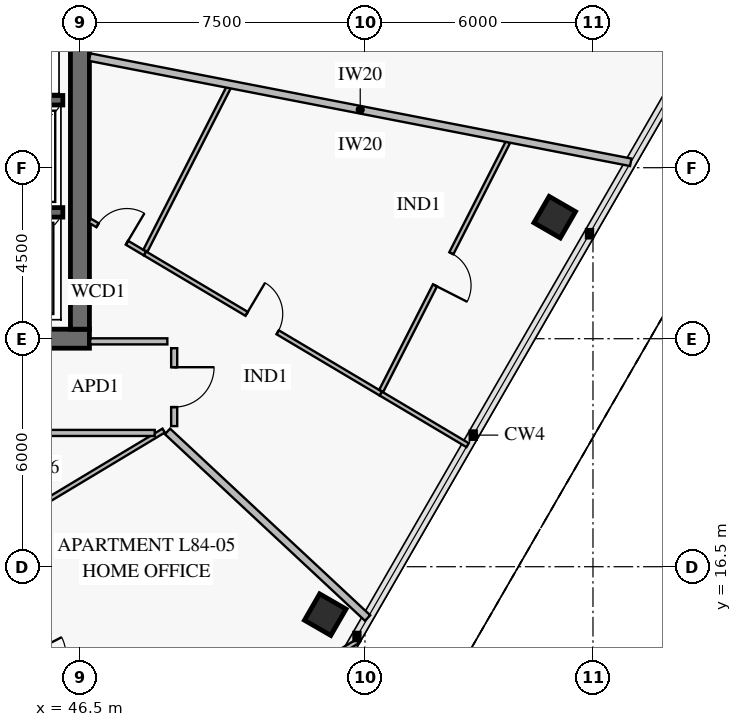
"""IFC4 building model, lengths in metres.
Left out: names, types, materials, properties, quantities, classifications, styles, units other than length and angle.
Written with IfcOpenShell. Run it as: python <this file> out.ifc"""

import sys

from ifc_helpers import new_model, si_unit, direction, frame, frame_2d, origin, origin_2d, place, context, subcontext, project, spatial, rectangle, extrude, element, fill, save


model = new_model("IFC4")
c1 = context("Model", 3, precision=1e-05, world=origin(), true_north=direction((0.0, 1.0)))
c2 = subcontext(c1, "Body", "Model", "MODEL_VIEW")
j1 = project(units=[si_unit("LENGTHUNIT", "METRE"), si_unit("PLANEANGLEUNIT", "RADIAN")], contexts=[c1])
p1 = place(None, origin())
s1 = spatial("IfcSite", under=j1, at=p1, CompositionType="ELEMENT")
p2 = place(p1, origin())
s2 = spatial("IfcBuilding", under=s1, at=p2, CompositionType="ELEMENT")
p3 = place(p2, frame((0.0, 0.0, 331.0)))
s3 = spatial("IfcBuildingStorey", under=s2, at=p3, CompositionType="ELEMENT", Elevation=331.0)
p4 = place(p3, frame((37.35, 22.5, 0.0), z_axis=(0.0, 0.0, 1.0), x_axis=(1.0, 0.0, 0.0)))
e1 = element("IfcWall", 1, at=p4, inside=s3, PredefinedType="SHEAR", context=c2, shape_type="SweptSolid", body=[
    extrude(rectangle(XDim=9.4, YDim=0.5, at=frame_2d((4.7, 0.0))), origin(), (0.0, 0.0, 1.0), 3.8),
])
p5 = place(p4, frame((3.95, 0.0, 0.0)))
e2 = element("IfcOpeningElement", 2, at=p5, cuts=e1, PredefinedType="OPENING", context=c2, shape_type="SweptSolid", body=[
    extrude(rectangle(XDim=1.5, YDim=2.15, at=frame_2d((0.75, 1.075))), frame((0.0, 0.262, 0.0), z_axis=(0.0, -1.0, 0.0), x_axis=(1.0, 0.0, 0.0)), (0.0, 0.0, 1.0), 0.524),
])
p6 = place(p3, frame((46.5, 22.75, 0.0), z_axis=(0.0, 0.0, 1.0), x_axis=(0.0, 1.0, 0.0)))
e3 = element("IfcWall", 3, at=p6, inside=s3, PredefinedType="SHEAR", context=c2, shape_type="SweptSolid", body=[
    extrude(rectangle(XDim=18.5, YDim=0.5, at=frame_2d((9.25, 0.0))), origin(), (0.0, 0.0, 1.0), 3.8),
])
p7 = place(p6, frame((9.0, 0.0, 0.0)))
e4 = element("IfcOpeningElement", 4, at=p7, cuts=e3, PredefinedType="OPENING", context=c2, shape_type="SweptSolid", body=[
    extrude(rectangle(XDim=1.1, YDim=2.15, at=frame_2d((0.55, 1.075))), frame((0.0, 0.262, 0.0), z_axis=(0.0, -1.0, 0.0), x_axis=(1.0, 0.0, 0.0)), (0.0, 0.0, 1.0), 0.524),
])
for number, where, z_axis, x_axis in (
    (5, (52.955, 15.238, 0.0), (0.0, 0.0, 1.0), (0.5, 0.866, 0.0)),
    (6, (58.993, 25.698, 0.0), (0.0, 0.0, 1.0), (0.5, 0.866, 0.0)),
):
    element("IfcColumn", number, at=place(p3, frame(where, z_axis=z_axis, x_axis=x_axis)), inside=s3, PredefinedType="COLUMN", context=c2, shape_type="SweptSolid", body=[
        extrude(rectangle(XDim=0.8, YDim=0.8, at=origin_2d()), origin(), (0.0, 0.0, 1.0), 3.55),
    ])
for number, where, z_axis, x_axis in (
    (7, (43.8, 25.825, 0.0), (0.0, 0.0, 1.0), (1.0, 0.0, 0.0)),
    (8, (43.8, 28.775, 0.0), (0.0, 0.0, 1.0), (1.0, 0.0, 0.0)),
):
    element("IfcWall", number, at=place(p3, frame(where, z_axis=z_axis, x_axis=x_axis)), inside=s3, PredefinedType="SOLIDWALL", context=c2, shape_type="SweptSolid", body=[
        extrude(rectangle(XDim=2.25, YDim=0.25, at=frame_2d((1.125, 0.0))), origin(), (0.0, 0.0, 1.0), 3.8),
    ])
p8 = place(p3, frame((43.708, 17.052, 0.0), z_axis=(0.0, 0.0, 1.0), x_axis=(0.458373868426, -0.888759470692, 0.0)))
e9 = element("IfcWall", 9, at=p8, inside=s3, PredefinedType="PARTITIONING", context=c2, shape_type="SweptSolid", body=[
    extrude(rectangle(XDim=7.397, YDim=0.12, at=frame_2d((3.698, 0.0))), origin(), (0.0, 0.0, 1.0), 2.97),
])
p9 = place(p8, frame((3.198, 0.0, 0.0)))
e10 = element("IfcOpeningElement", 10, at=p9, cuts=e9, PredefinedType="OPENING", context=c2, shape_type="SweptSolid", body=[
    extrude(rectangle(XDim=0.95, YDim=2.1, at=frame_2d((0.475, 1.05))), frame((0.0, 0.072, 0.0), z_axis=(0.0, -1.0, 0.0), x_axis=(1.0, 0.0, 0.0)), (0.0, 0.0, 1.0), 0.144),
])
p10 = place(p3, frame((47.146, 10.535, 0.0), z_axis=(0.0, 0.0, 1.0), x_axis=(0.857151907368, 0.515063692853, 0.0)))
e11 = element("IfcWall", 11, at=p10, inside=s3, PredefinedType="PARTITIONING", context=c2, shape_type="SweptSolid", body=[
    extrude(rectangle(XDim=7.774, YDim=0.12, at=frame_2d((3.887, 0.0))), origin(), (0.0, 0.0, 1.0), 3.55),
])
p11 = place(p10, frame((2.228, 0.0, 0.0)))
e12 = element("IfcOpeningElement", 12, at=p11, cuts=e11, PredefinedType="OPENING", context=c2, shape_type="SweptSolid", body=[
    extrude(rectangle(XDim=0.95, YDim=2.1, at=frame_2d((0.475, 1.05))), frame((0.0, 0.072, 0.0), z_axis=(0.0, -1.0, 0.0), x_axis=(1.0, 0.0, 0.0)), (0.0, 0.0, 1.0), 0.144),
])
p12 = place(p3, frame((46.758, 25.607, 0.0), z_axis=(0.0, 0.0, 1.0), x_axis=(0.859597506205, -0.51097174807, 0.0)))
e13 = element("IfcWall", 13, at=p12, inside=s3, PredefinedType="PARTITIONING", context=c2, shape_type="SweptSolid", body=[
    extrude(rectangle(XDim=1.693, YDim=0.12, at=frame_2d((0.847, 0.0))), origin(), (0.0, 0.0, 1.0), 3.55),
])
p13 = place(p12, frame((0.239, 0.0, 0.0)))
e14 = element("IfcOpeningElement", 14, at=p13, cuts=e13, PredefinedType="OPENING", context=c2, shape_type="SweptSolid", body=[
    extrude(rectangle(XDim=0.9, YDim=2.1, at=frame_2d((0.45, 1.05))), frame((0.0, 0.072, 0.0), z_axis=(0.0, -1.0, 0.0), x_axis=(1.0, 0.0, 0.0)), (0.0, 0.0, 1.0), 0.144),
])
p14 = place(p3, frame((48.214, 24.742, 0.0), z_axis=(0.0, 0.0, 1.0), x_axis=(0.859681622752, -0.510830213968, 0.0)))
e15 = element("IfcWall", 15, at=p14, inside=s3, PredefinedType="PARTITIONING", context=c2, shape_type="SweptSolid", body=[
    extrude(rectangle(XDim=7.218, YDim=0.12, at=frame_2d((3.609, 0.0))), origin(), (0.0, 0.0, 1.0), 3.2),
])
p15 = place(p14, frame((3.109, 0.0, 0.0)))
e16 = element("IfcOpeningElement", 16, at=p15, cuts=e15, PredefinedType="OPENING", context=c2, shape_type="SweptSolid", body=[
    extrude(rectangle(XDim=0.95, YDim=2.1, at=frame_2d((0.475, 1.05))), frame((0.0, 0.072, 0.0), z_axis=(0.0, -1.0, 0.0), x_axis=(1.0, 0.0, 0.0)), (0.0, 0.0, 1.0), 0.144),
])
p16 = place(p3, frame((54.428, 21.128, 0.0), z_axis=(0.0, 0.0, 1.0), x_axis=(0.453980042954, 0.89101185211, 0.0)))
e17 = element("IfcWall", 17, at=p16, inside=s3, PredefinedType="PARTITIONING", context=c2, shape_type="SweptSolid", body=[
    extrude(rectangle(XDim=7.347, YDim=0.12, at=frame_2d((3.673, 0.0))), origin(), (0.0, 0.0, 1.0), 3.0),
])
p17 = place(p16, frame((3.114, 0.0, 0.0)))
e18 = element("IfcOpeningElement", 18, at=p17, cuts=e17, PredefinedType="OPENING", context=c2, shape_type="SweptSolid", body=[
    extrude(rectangle(XDim=0.95, YDim=2.1, at=frame_2d((0.475, 1.05))), frame((0.0, 0.072, 0.0), z_axis=(0.0, -1.0, 0.0), x_axis=(1.0, 0.0, 0.0)), (0.0, 0.0, 1.0), 0.144),
])
p18 = place(p3, frame((48.98, 20.2, 0.0), z_axis=(0.0, 0.0, 1.0), x_axis=(0.0, 1.0, 0.0)))
e19 = element("IfcWall", 19, at=p18, inside=s3, PredefinedType="PARTITIONING", context=c2, shape_type="SweptSolid", body=[
    extrude(rectangle(XDim=2.05, YDim=0.16, at=frame_2d((1.025, 0.0))), origin(), (0.0, 0.0, 1.0), 3.55),
])
p19 = place(p18, frame((0.5, 0.0, 0.0)))
e20 = element("IfcOpeningElement", 20, at=p19, cuts=e19, PredefinedType="OPENING", context=c2, shape_type="SweptSolid", body=[
    extrude(rectangle(XDim=1.05, YDim=2.15, at=frame_2d((0.525, 1.075))), frame((0.0, 0.092, 0.0), z_axis=(0.0, -1.0, 0.0), x_axis=(1.0, 0.0, 0.0)), (0.0, 0.0, 1.0), 0.184),
])
p20 = place(p3, frame((43.756, 17.109, 0.0), z_axis=(0.0, 0.0, 1.0), x_axis=(0.857171838157, 0.515030523242, 0.0)))
e21 = element("IfcWall", 21, at=p20, inside=s3, PredefinedType="PARTITIONING", context=c2, shape_type="SweptSolid", body=[
    extrude(rectangle(XDim=5.773, YDim=0.12, at=frame_2d((2.886, 0.0))), origin(), (0.0, 0.0, 1.0), 3.0),
])
p21 = place(p3, frame((48.804, 20.06, 0.0), z_axis=(0.0, 0.0, 1.0), x_axis=(0.731343856779, -0.682008917208, 0.0)))
e22 = element("IfcWall", 22, at=p21, inside=s3, PredefinedType="PARTITIONING", context=c2, shape_type="SweptSolid", body=[
    extrude(rectangle(XDim=7.2, YDim=0.2, at=frame_2d((3.6, 0.0))), origin(), (0.0, 0.0, 1.0), 2.97),
])
p22 = place(p3, frame((54.419, 21.055, 0.0), z_axis=(0.0, 0.0, 1.0), x_axis=(0.859699573503, -0.510800003249, 0.0)))
e23 = element("IfcWall", 23, at=p22, inside=s3, PredefinedType="PARTITIONING", context=c2, shape_type="SweptSolid", body=[
    extrude(rectangle(XDim=2.656, YDim=0.12, at=frame_2d((1.328, 0.0))), origin(), (0.0, 0.0, 1.0), 2.97),
])
p23 = place(p3, frame((48.223, 24.816, 0.0), z_axis=(0.0, 0.0, 1.0), x_axis=(0.453984233439, 0.891009717, 0.0)))
e24 = element("IfcWall", 24, at=p23, inside=s3, PredefinedType="PARTITIONING", context=c2, shape_type="SweptSolid", body=[
    extrude(rectangle(XDim=4.88, YDim=0.12, at=frame_2d((2.44, 0.0))), origin(), (0.0, 0.0, 1.0), 3.0),
])
p24 = place(p3, frame((46.758, 29.909, 0.0), z_axis=(0.0, 0.0, 1.0), x_axis=(0.981626953462, -0.190810178544, 0.0)))
e25 = element("IfcWall", 25, at=p24, inside=s3, PredefinedType="PARTITIONING", context=c2, shape_type="SweptSolid", body=[
    extrude(rectangle(XDim=14.502, YDim=0.2, at=frame_2d((7.251, 0.0))), origin(), (0.0, 0.0, 1.0), 2.97),
])
p25 = place(p3, frame((42.255, 20.02, 0.0), z_axis=(0.0, 0.0, 1.0), x_axis=(1.0, 0.0, 0.0)))
e26 = element("IfcWall", 26, at=p25, inside=s3, PredefinedType="PARTITIONING", context=c2, shape_type="SweptSolid", body=[
    extrude(rectangle(XDim=6.213, YDim=0.16, at=frame_2d((3.107, 0.0))), origin(), (0.0, 0.0, 1.0), 3.0),
])
p26 = place(p3, frame((48.8, 22.43, 0.0), z_axis=(0.0, 0.0, 1.0), x_axis=(-1.0, 0.0, 0.0)))
e27 = element("IfcWall", 27, at=p26, inside=s3, PredefinedType="PARTITIONING", context=c2, shape_type="SweptSolid", body=[
    extrude(rectangle(XDim=2.03, YDim=0.16, at=frame_2d((1.015, 0.0))), origin(), (0.0, 0.0, 1.0), 3.55),
])
p27 = place(p13, origin())
e28 = element("IfcDoor", 28, at=p27, inside=s3, OperationType="SINGLE_SWING_RIGHT", PredefinedType="DOOR", context=c2, shape_type="SweptSolid", body=[
    extrude(rectangle(XDim=0.9, YDim=2.1, at=frame_2d((0.45, 1.05))), frame((0.0, 0.025, 0.0), z_axis=(0.0, -1.0, 0.0), x_axis=(1.0, 0.0, 0.0)), (0.0, 0.0, 1.0), 0.05),
])
fill(e14, e28)
p28 = place(p15, origin())
e29 = element("IfcDoor", 29, at=p28, inside=s3, OperationType="SINGLE_SWING_LEFT", PredefinedType="DOOR", context=c2, shape_type="SweptSolid", body=[
    extrude(rectangle(XDim=0.95, YDim=2.1, at=frame_2d((0.475, 1.05))), frame((0.0, 0.025, 0.0), z_axis=(0.0, -1.0, 0.0), x_axis=(1.0, 0.0, 0.0)), (0.0, 0.0, 1.0), 0.05),
])
fill(e16, e29)
p29 = place(p17, frame((0.95, 0.0, 0.0), z_axis=(0.0, 0.0, 1.0), x_axis=(-1.0, 0.0, 0.0)))
e30 = element("IfcDoor", 30, at=p29, inside=s3, OperationType="SINGLE_SWING_RIGHT", PredefinedType="DOOR", context=c2, shape_type="SweptSolid", body=[
    extrude(rectangle(XDim=0.95, YDim=2.1, at=frame_2d((0.475, 1.05))), frame((0.0, 0.025, 0.0), z_axis=(0.0, -1.0, 0.0), x_axis=(1.0, 0.0, 0.0)), (0.0, 0.0, 1.0), 0.05),
])
fill(e18, e30)
p30 = place(p19, frame((1.05, 0.0, 0.0), z_axis=(0.0, 0.0, 1.0), x_axis=(-1.0, 0.0, 0.0)))
e31 = element("IfcDoor", 31, at=p30, inside=s3, OperationType="SINGLE_SWING_LEFT", PredefinedType="DOOR", context=c2, shape_type="SweptSolid", body=[
    extrude(rectangle(XDim=1.05, YDim=2.15, at=frame_2d((0.525, 1.075))), frame((0.0, 0.025, 0.0), z_axis=(0.0, -1.0, 0.0), x_axis=(1.0, 0.0, 0.0)), (0.0, 0.0, 1.0), 0.05),
])
fill(e20, e31)
save(model, sys.argv[1])
